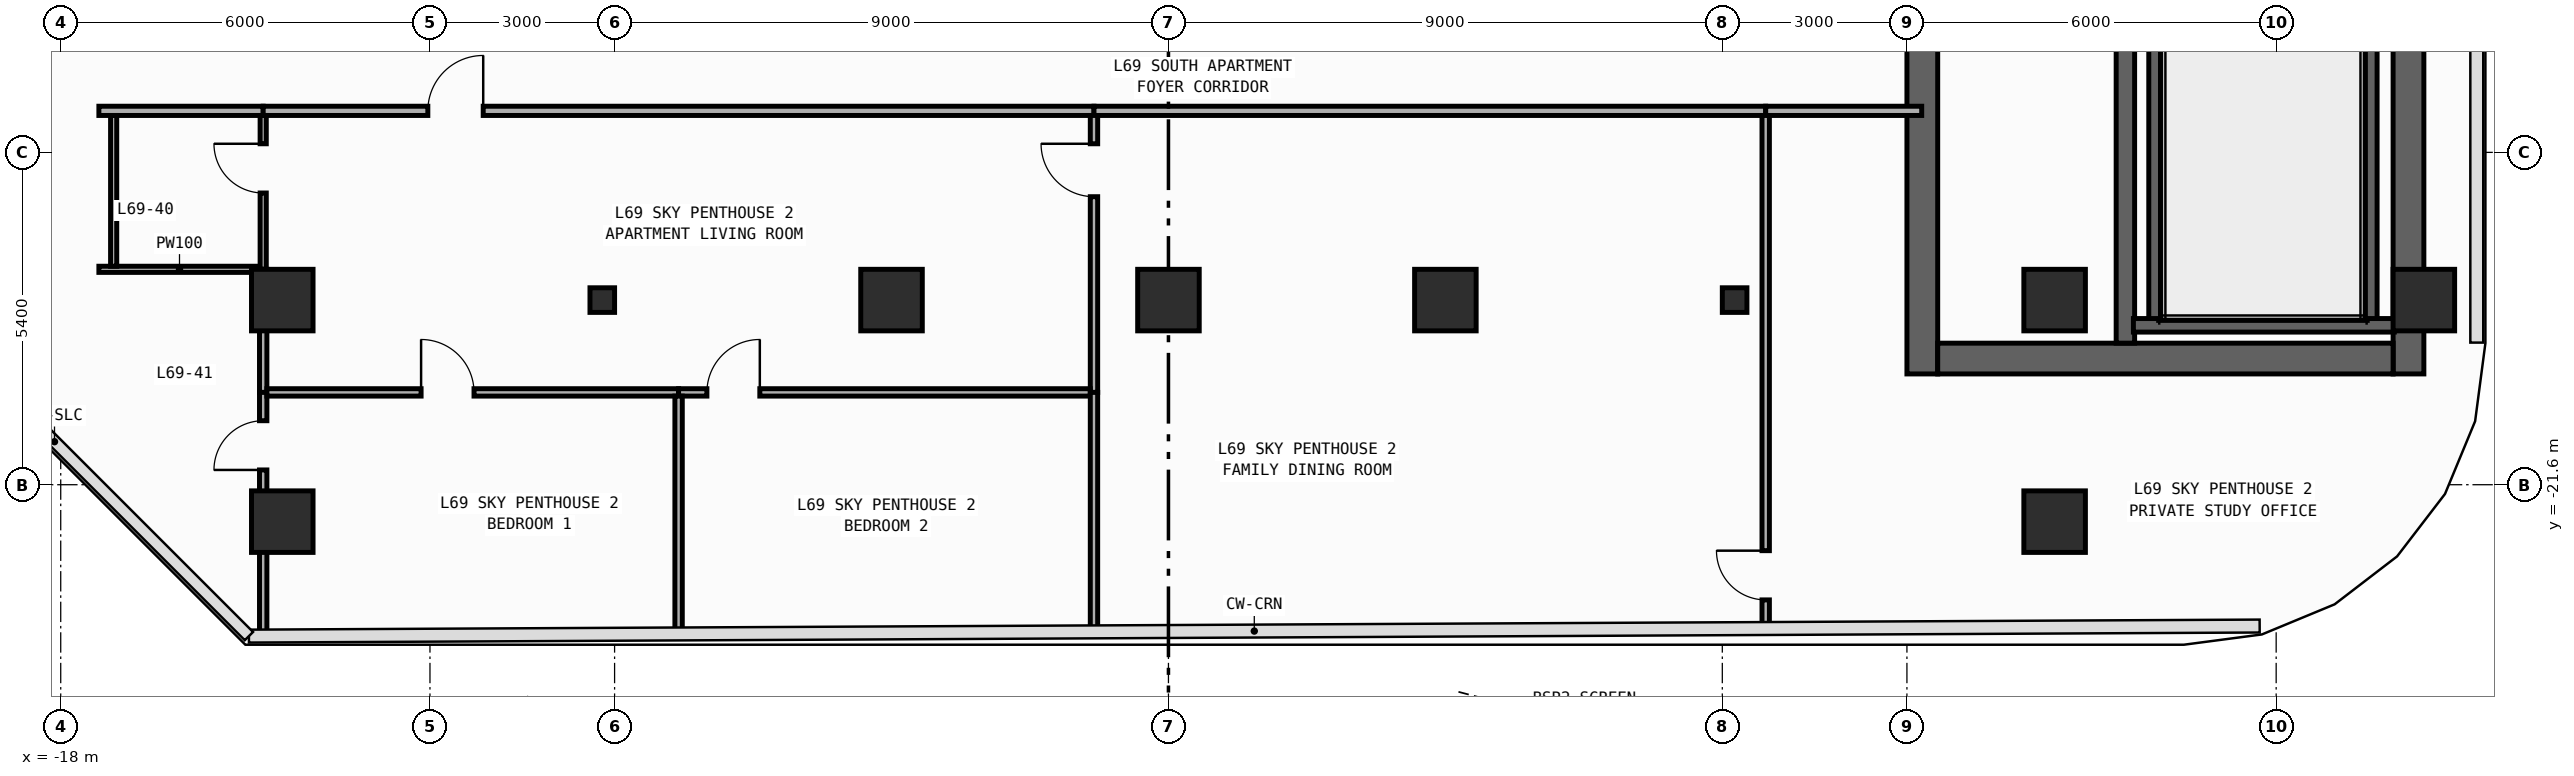
"""IFC4 building model, lengths in metres.
Left out: names, types, materials, properties, quantities, classifications, styles, units other than length and angle.
Written with IfcOpenShell. Run it as: python <this file> out.ifc"""

import sys

from ifc_helpers import new_model, si_unit, direction, frame, frame_2d, origin, origin_2d, place, context, subcontext, project, spatial, rectangle, circle, i_section, extrude, element, fill, save


model = new_model("IFC4")
c1 = context("Model", 3, precision=1e-05, world=origin(), true_north=direction((0.0, 1.0)))
c2 = subcontext(c1, "Body", "Model", "MODEL_VIEW")
j1 = project(units=[si_unit("LENGTHUNIT", "METRE"), si_unit("PLANEANGLEUNIT", "RADIAN")], contexts=[c1])
p1 = place(None, origin())
s1 = spatial("IfcSite", under=j1, at=p1, CompositionType="ELEMENT")
p2 = place(p1, origin())
s2 = spatial("IfcBuilding", under=s1, at=p2, CompositionType="ELEMENT")
p3 = place(p2, frame((0.0, 0.0, 289.0)))
s3 = spatial("IfcBuildingStorey", under=s2, at=p3, CompositionType="ELEMENT", Elevation=289.0)
p4 = place(p3, frame((12.25, -19.8, 0.0), z_axis=(0.0, 0.0, 1.0), x_axis=(0.0, 1.0, 0.0)))
e1 = element("IfcWall", 1, at=p4, inside=s3, PredefinedType="SHEAR", context=c2, shape_type="SweptSolid", body=[
    extrude(rectangle(XDim=27.0, YDim=0.5, at=frame_2d((13.5, 0.0))), origin(), (0.0, 0.0, 1.0), 3.54),
])
p5 = place(p4, frame((23.05, 0.0, 0.0)))
e2 = element("IfcOpeningElement", 2, at=p5, cuts=e1, PredefinedType="OPENING", context=c2, shape_type="SweptSolid", body=[
    extrude(rectangle(XDim=1.1, YDim=2.2, at=frame_2d((0.55, 1.1))), frame((0.0, 0.26, 0.0), z_axis=(0.0, -1.0, 0.0), x_axis=(1.0, 0.0, 0.0)), (0.0, 0.0, 1.0), 0.52),
])
p6 = place(p4, frame((19.85, 0.0, 0.0)))
e3 = element("IfcOpeningElement", 3, at=p6, cuts=e1, PredefinedType="OPENING", context=c2, shape_type="SweptSolid", body=[
    extrude(rectangle(XDim=1.1, YDim=2.2, at=frame_2d((0.55, 1.1))), frame((0.0, 0.26, 0.0), z_axis=(0.0, -1.0, 0.0), x_axis=(1.0, 0.0, 0.0)), (0.0, 0.0, 1.0), 0.52),
])
p7 = place(p4, frame((16.65, 0.0, 0.0)))
e4 = element("IfcOpeningElement", 4, at=p7, cuts=e1, PredefinedType="OPENING", context=c2, shape_type="SweptSolid", body=[
    extrude(rectangle(XDim=1.1, YDim=2.2, at=frame_2d((0.55, 1.1))), frame((0.0, 0.26, 0.0), z_axis=(0.0, -1.0, 0.0), x_axis=(1.0, 0.0, 0.0)), (0.0, 0.0, 1.0), 0.52),
])
p8 = place(p4, frame((10.175, 0.0, 0.0)))
e5 = element("IfcOpeningElement", 5, at=p8, cuts=e1, PredefinedType="OPENING", context=c2, shape_type="SweptSolid", body=[
    extrude(rectangle(XDim=0.85, YDim=2.1, at=frame_2d((0.425, 1.05))), frame((0.0, 0.26, 0.0), z_axis=(0.0, -1.0, 0.0), x_axis=(1.0, 0.0, 0.0)), (0.0, 0.0, 1.0), 0.52),
])
p9 = place(p4, frame((12.725, 0.0, 0.0)))
e6 = element("IfcOpeningElement", 6, at=p9, cuts=e1, PredefinedType="OPENING", context=c2, shape_type="SweptSolid", body=[
    extrude(rectangle(XDim=1.15, YDim=2.2, at=frame_2d((0.575, 1.1))), frame((0.0, 0.26, 0.0), z_axis=(0.0, -1.0, 0.0), x_axis=(1.0, 0.0, 0.0)), (0.0, 0.0, 1.0), 0.52),
])
p10 = place(p4, frame((25.125, 0.0, 0.0)))
e7 = element("IfcOpeningElement", 7, at=p10, cuts=e1, PredefinedType="OPENING", context=c2, shape_type="SweptSolid", body=[
    extrude(rectangle(XDim=0.85, YDim=2.1, at=frame_2d((0.425, 1.05))), frame((0.0, 0.26, 0.0), z_axis=(0.0, -1.0, 0.0), x_axis=(1.0, 0.0, 0.0)), (0.0, 0.0, 1.0), 0.52),
])
p11 = place(p3, frame((20.15, -19.8, 0.0), z_axis=(0.0, 0.0, 1.0), x_axis=(0.0, 1.0, 0.0)))
e8 = element("IfcWall", 8, at=p11, inside=s3, PredefinedType="SHEAR", context=c2, shape_type="SweptSolid", body=[
    extrude(rectangle(XDim=27.0, YDim=0.5, at=frame_2d((13.5, 0.0))), origin(), (0.0, 0.0, 1.0), 3.54),
])
p12 = place(p3, frame((12.5, -19.55, 0.0), z_axis=(0.0, 0.0, 1.0), x_axis=(1.0, 0.0, 0.0)))
e9 = element("IfcWall", 9, at=p12, inside=s3, PredefinedType="SHEAR", context=c2, shape_type="SweptSolid", body=[
    extrude(rectangle(XDim=7.4, YDim=0.5, at=frame_2d((3.7, 0.0))), origin(), (0.0, 0.0, 1.0), 3.54),
])
p13 = place(p3, frame((15.55, -19.3, 0.0), z_axis=(0.0, 0.0, 1.0), x_axis=(0.0, 1.0, 0.0)))
e10 = element("IfcWall", 10, at=p13, inside=s3, PredefinedType="SHEAR", context=c2, shape_type="SweptSolid", body=[
    extrude(rectangle(XDim=26.0, YDim=0.3, at=frame_2d((13.0, 0.0))), origin(), (0.0, 0.0, 1.0), 3.54),
])
p14 = place(p13, frame((12.225, 0.0, 0.0)))
e11 = element("IfcOpeningElement", 11, at=p14, cuts=e10, PredefinedType="OPENING", context=c2, shape_type="SweptSolid", body=[
    extrude(rectangle(XDim=1.15, YDim=2.2, at=frame_2d((0.575, 1.1))), frame((0.0, 0.16, 0.0), z_axis=(0.0, -1.0, 0.0), x_axis=(1.0, 0.0, 0.0)), (0.0, 0.0, 1.0), 0.32),
])
p15 = place(p13, frame((24.625, 0.0, 0.0)))
e12 = element("IfcOpeningElement", 12, at=p15, cuts=e10, PredefinedType="OPENING", context=c2, shape_type="SweptSolid", body=[
    extrude(rectangle(XDim=0.85, YDim=2.1, at=frame_2d((0.425, 1.05))), frame((0.0, 0.16, 0.0), z_axis=(0.0, -1.0, 0.0), x_axis=(1.0, 0.0, 0.0)), (0.0, 0.0, 1.0), 0.32),
])
for number, where, z_axis, x_axis in (
    (13, (16.04, -19.01, 0.0), (0.0, 0.0, 1.0), (0.0, 1.0, 0.0)),
    (14, (19.53, -19.01, 0.0), (0.0, 0.0, 1.0), (0.0, 1.0, 0.0)),
):
    element("IfcWall", number, at=place(p3, frame(where, z_axis=z_axis, x_axis=x_axis)), inside=s3, PredefinedType="SHEAR", context=c2, shape_type="SweptSolid", body=[
        extrude(rectangle(XDim=11.42, YDim=0.22, at=frame_2d((5.71, 0.0))), origin(), (0.0, 0.0, 1.0), 3.54),
    ])
p16 = place(p3, frame((15.68, -19.01, 0.0), z_axis=(0.0, 0.0, 1.0), x_axis=(1.0, 0.0, 0.0)))
e15 = element("IfcWall", 15, at=p16, inside=s3, PredefinedType="SHEAR", context=c2, shape_type="SweptSolid", body=[
    extrude(rectangle(XDim=4.24, YDim=0.22, at=frame_2d((2.12, 0.0))), origin(), (0.0, 0.0, 1.0), 3.54),
])
for number, where, z_axis, x_axis in (
    (16, (-9.2, -18.6, 0.0), (0.0, 0.0, 1.0), (1.0, 0.0, 0.0)),
    (17, (9.2, -18.6, 0.0), (0.0, 0.0, 1.0), (1.0, 0.0, 0.0)),
):
    element("IfcColumn", number, at=place(p3, frame(where, z_axis=z_axis, x_axis=x_axis)), inside=s3, PredefinedType="COLUMN", context=c2, shape_type="SweptSolid", body=[
        extrude(i_section(OverallWidth=0.4, OverallDepth=0.4, WebThickness=0.013, FlangeThickness=0.021, FilletRadius=0.022, at=origin_2d()), origin(), (0.0, 0.0, 1.0), 3.8),
    ])
for number, where, z_axis, x_axis in (
    (18, (20.4, -18.6, 0.0), (0.0, 0.0, 1.0), (1.0, 0.0, 0.0)),
    (19, (-14.4, -18.6, 0.0), (0.0, 0.0, 1.0), (1.0, 0.0, 0.0)),
    (20, (14.4, -18.6, 0.0), (0.0, 0.0, 1.0), (1.0, 0.0, 0.0)),
    (21, (-4.5, -18.6, 0.0), (0.0, 0.0, 1.0), (1.0, 0.0, 0.0)),
    (22, (0.0, -18.6, 0.0), (0.0, 0.0, 1.0), (1.0, 0.0, 0.0)),
    (23, (4.5, -18.6, 0.0), (0.0, 0.0, 1.0), (1.0, 0.0, 0.0)),
    (24, (-14.4, -22.2, 0.0), (0.0, 0.0, 1.0), (1.0, 0.0, 0.0)),
    (25, (14.4, -22.2, 0.0), (0.0, 0.0, 1.0), (1.0, 0.0, 0.0)),
):
    element("IfcColumn", number, at=place(p3, frame(where, z_axis=z_axis, x_axis=x_axis)), inside=s3, PredefinedType="COLUMN", context=c2, shape_type="SweptSolid", body=[
        extrude(circle(Radius=0.5, at=origin_2d()), origin(), (0.0, 0.0, 1.0), 3.8),
    ])
p17 = place(p3, frame((-17.38, -15.525, 0.0), z_axis=(0.0, 0.0, 1.0), x_axis=(1.0, 0.0, 0.0)))
e26 = element("IfcWall", 26, at=p17, inside=s3, PredefinedType="PARTITIONING", context=c2, shape_type="SweptSolid", body=[
    extrude(rectangle(XDim=2.67, YDim=0.15, at=frame_2d((1.335, 0.0))), origin(), (0.0, 0.0, 1.0), 3.54),
])
p18 = place(p3, frame((-14.71, -15.525, 0.0), z_axis=(0.0, 0.0, 1.0), x_axis=(1.0, 0.0, 0.0)))
e27 = element("IfcWall", 27, at=p18, inside=s3, PredefinedType="PARTITIONING", context=c2, shape_type="SweptSolid", body=[
    extrude(rectangle(XDim=13.5, YDim=0.15, at=frame_2d((6.75, 0.0))), origin(), (0.0, 0.0, 1.0), 3.54),
])
p19 = place(p18, frame((2.675, 0.0, 0.0)))
e28 = element("IfcOpeningElement", 28, at=p19, cuts=e27, PredefinedType="OPENING", context=c2, shape_type="SweptSolid", body=[
    extrude(rectangle(XDim=0.9, YDim=2.15, at=frame_2d((0.45, 1.075))), frame((0.0, 0.085, 0.0), z_axis=(0.0, -1.0, 0.0), x_axis=(1.0, 0.0, 0.0)), (0.0, 0.0, 1.0), 0.17),
])
p20 = place(p3, frame((-1.21, -15.525, 0.0), z_axis=(0.0, 0.0, 1.0), x_axis=(1.0, 0.0, 0.0)))
e29 = element("IfcWall", 29, at=p20, inside=s3, PredefinedType="PARTITIONING", context=c2, shape_type="SweptSolid", body=[
    extrude(rectangle(XDim=10.915, YDim=0.15, at=frame_2d((5.458, 0.0))), origin(), (0.0, 0.0, 1.0), 3.54),
])
p21 = place(p3, frame((9.705, -15.525, 0.0), z_axis=(0.0, 0.0, 1.0), x_axis=(1.0, 0.0, 0.0)))
e30 = element("IfcWall", 30, at=p21, inside=s3, PredefinedType="PARTITIONING", context=c2, shape_type="SweptSolid", body=[
    extrude(rectangle(XDim=2.535, YDim=0.15, at=frame_2d((1.268, 0.0))), origin(), (0.0, 0.0, 1.0), 3.54),
])
p22 = place(p3, frame((-17.38, -18.1, 0.0), z_axis=(0.0, 0.0, 1.0), x_axis=(1.0, 0.0, 0.0)))
e31 = element("IfcWall", 31, at=p22, inside=s3, PredefinedType="PARTITIONING", context=c2, shape_type="SweptSolid", body=[
    extrude(rectangle(XDim=2.62, YDim=0.1, at=frame_2d((1.31, 0.0))), origin(), (0.0, 0.0, 1.0), 3.54),
])
p23 = place(p3, frame((-14.71, -18.1, 0.0), z_axis=(0.0, 0.0, 1.0), x_axis=(0.0, 1.0, 0.0)))
e32 = element("IfcWall", 32, at=p23, inside=s3, PredefinedType="PARTITIONING", context=c2, shape_type="SweptSolid", body=[
    extrude(rectangle(XDim=2.5, YDim=0.1, at=frame_2d((1.25, 0.0))), origin(), (0.0, 0.0, 1.0), 2.64),
])
p24 = place(p23, frame((1.24, 0.0, 0.0)))
e33 = element("IfcOpeningElement", 33, at=p24, cuts=e32, PredefinedType="OPENING", context=c2, shape_type="SweptSolid", body=[
    extrude(rectangle(XDim=0.8, YDim=2.1, at=frame_2d((0.4, 1.05))), frame((0.0, 0.06, 0.0), z_axis=(0.0, -1.0, 0.0), x_axis=(1.0, 0.0, 0.0)), (0.0, 0.0, 1.0), 0.12),
])
p25 = place(p3, frame((-14.71, -20.1, 0.0), z_axis=(0.0, 0.0, 1.0), x_axis=(0.0, 1.0, 0.0)))
e34 = element("IfcWall", 34, at=p25, inside=s3, PredefinedType="PARTITIONING", context=c2, shape_type="SweptSolid", body=[
    extrude(rectangle(XDim=2.0, YDim=0.12, at=frame_2d((1.0, 0.0))), origin(), (0.0, 0.0, 1.0), 2.64),
])
p26 = place(p3, frame((-14.71, -24.054, 0.0), z_axis=(0.0, 0.0, 1.0), x_axis=(0.0, 1.0, 0.0)))
e35 = element("IfcWall", 35, at=p26, inside=s3, PredefinedType="PARTITIONING", context=c2, shape_type="SweptSolid", body=[
    extrude(rectangle(XDim=3.954, YDim=0.12, at=frame_2d((1.977, 0.0))), origin(), (0.0, 0.0, 1.0), 2.64),
])
p27 = place(p26, frame((2.694, 0.0, 0.0)))
e36 = element("IfcOpeningElement", 36, at=p27, cuts=e35, PredefinedType="OPENING", context=c2, shape_type="SweptSolid", body=[
    extrude(rectangle(XDim=0.8, YDim=2.1, at=frame_2d((0.4, 1.05))), frame((0.0, 0.07, 0.0), z_axis=(0.0, -1.0, 0.0), x_axis=(1.0, 0.0, 0.0)), (0.0, 0.0, 1.0), 0.14),
])
p28 = place(p3, frame((-1.21, -20.1, 0.0), z_axis=(0.0, 0.0, 1.0), x_axis=(0.0, 1.0, 0.0)))
e37 = element("IfcWall", 37, at=p28, inside=s3, PredefinedType="PARTITIONING", context=c2, shape_type="SweptSolid", body=[
    extrude(rectangle(XDim=4.5, YDim=0.12, at=frame_2d((2.25, 0.0))), origin(), (0.0, 0.0, 1.0), 3.54),
])
p29 = place(p28, frame((3.18, 0.0, 0.0)))
e38 = element("IfcOpeningElement", 38, at=p29, cuts=e37, PredefinedType="OPENING", context=c2, shape_type="SweptSolid", body=[
    extrude(rectangle(XDim=0.86, YDim=2.15, at=frame_2d((0.43, 1.075))), frame((0.0, 0.07, 0.0), z_axis=(0.0, -1.0, 0.0), x_axis=(1.0, 0.0, 0.0)), (0.0, 0.0, 1.0), 0.14),
])
p30 = place(p3, frame((-14.65, -20.1, 0.0), z_axis=(0.0, 0.0, 1.0), x_axis=(1.0, 0.0, 0.0)))
e39 = element("IfcWall", 39, at=p30, inside=s3, PredefinedType="PARTITIONING", context=c2, shape_type="SweptSolid", body=[
    extrude(rectangle(XDim=6.69, YDim=0.12, at=frame_2d((3.345, 0.0))), origin(), (0.0, 0.0, 1.0), 3.54),
])
p31 = place(p30, frame((2.506, 0.0, 0.0)))
e40 = element("IfcOpeningElement", 40, at=p31, cuts=e39, PredefinedType="OPENING", context=c2, shape_type="SweptSolid", body=[
    extrude(rectangle(XDim=0.86, YDim=2.15, at=frame_2d((0.43, 1.075))), frame((0.0, 0.07, 0.0), z_axis=(0.0, -1.0, 0.0), x_axis=(1.0, 0.0, 0.0)), (0.0, 0.0, 1.0), 0.14),
])
p32 = place(p3, frame((-7.96, -20.1, 0.0), z_axis=(0.0, 0.0, 1.0), x_axis=(1.0, 0.0, 0.0)))
e41 = element("IfcWall", 41, at=p32, inside=s3, PredefinedType="PARTITIONING", context=c2, shape_type="SweptSolid", body=[
    extrude(rectangle(XDim=6.69, YDim=0.12, at=frame_2d((3.345, 0.0))), origin(), (0.0, 0.0, 1.0), 3.54),
])
p33 = place(p32, frame((0.46, 0.0, 0.0)))
e42 = element("IfcOpeningElement", 42, at=p33, cuts=e41, PredefinedType="OPENING", context=c2, shape_type="SweptSolid", body=[
    extrude(rectangle(XDim=0.86, YDim=2.15, at=frame_2d((0.43, 1.075))), frame((0.0, 0.07, 0.0), z_axis=(0.0, -1.0, 0.0), x_axis=(1.0, 0.0, 0.0)), (0.0, 0.0, 1.0), 0.14),
])
p34 = place(p3, frame((9.705, -23.932, 0.0), z_axis=(0.0, 0.0, 1.0), x_axis=(0.0, 1.0, 0.0)))
e43 = element("IfcWall", 43, at=p34, inside=s3, PredefinedType="PARTITIONING", context=c2, shape_type="SweptSolid", body=[
    extrude(rectangle(XDim=8.332, YDim=0.12, at=frame_2d((4.166, 0.0))), origin(), (0.0, 0.0, 1.0), 3.54),
])
p35 = place(p34, frame((0.46, 0.0, 0.0)))
e44 = element("IfcOpeningElement", 44, at=p35, cuts=e43, PredefinedType="OPENING", context=c2, shape_type="SweptSolid", body=[
    extrude(rectangle(XDim=0.8, YDim=2.1, at=frame_2d((0.4, 1.05))), frame((0.0, 0.07, 0.0), z_axis=(0.0, -1.0, 0.0), x_axis=(1.0, 0.0, 0.0)), (0.0, 0.0, 1.0), 0.14),
])
p36 = place(p3, frame((-1.21, -23.986, 0.0), z_axis=(0.0, 0.0, 1.0), x_axis=(0.0, 1.0, 0.0)))
e45 = element("IfcWall", 45, at=p36, inside=s3, PredefinedType="PARTITIONING", context=c2, shape_type="SweptSolid", body=[
    extrude(rectangle(XDim=3.886, YDim=0.12, at=frame_2d((1.943, 0.0))), origin(), (0.0, 0.0, 1.0), 3.54),
])
p37 = place(p3, frame((-7.96, -24.02, 0.0), z_axis=(0.0, 0.0, 1.0), x_axis=(0.0, 1.0, 0.0)))
e46 = element("IfcWall", 46, at=p37, inside=s3, PredefinedType="PARTITIONING", context=c2, shape_type="SweptSolid", body=[
    extrude(rectangle(XDim=3.86, YDim=0.12, at=frame_2d((1.93, 0.0))), origin(), (0.0, 0.0, 1.0), 3.54),
])
p38 = place(p3, frame((-17.14, -18.05, 0.0), z_axis=(0.0, 0.0, 1.0), x_axis=(0.0, 1.0, 0.0)))
e47 = element("IfcWall", 47, at=p38, inside=s3, PredefinedType="PARTITIONING", context=c2, shape_type="SweptSolid", body=[
    extrude(rectangle(XDim=2.45, YDim=0.1, at=frame_2d((1.225, 0.0))), origin(), (0.0, 0.0, 1.0), 3.54),
])
p39 = place(p19, origin())
e48 = element("IfcDoor", 48, at=p39, inside=s3, OperationType="SINGLE_SWING_RIGHT", PredefinedType="DOOR", context=c2, shape_type="SweptSolid", body=[
    extrude(rectangle(XDim=0.9, YDim=2.15, at=frame_2d((0.45, 1.075))), frame((0.0, 0.025, 0.0), z_axis=(0.0, -1.0, 0.0), x_axis=(1.0, 0.0, 0.0)), (0.0, 0.0, 1.0), 0.05),
])
fill(e28, e48)
p40 = place(p24, origin())
e49 = element("IfcDoor", 49, at=p40, inside=s3, OperationType="SINGLE_SWING_RIGHT", PredefinedType="DOOR", context=c2, shape_type="SweptSolid", body=[
    extrude(rectangle(XDim=0.8, YDim=2.1, at=frame_2d((0.4, 1.05))), frame((0.0, 0.025, 0.0), z_axis=(0.0, -1.0, 0.0), x_axis=(1.0, 0.0, 0.0)), (0.0, 0.0, 1.0), 0.05),
])
fill(e33, e49)
p41 = place(p29, origin())
e50 = element("IfcDoor", 50, at=p41, inside=s3, OperationType="SINGLE_SWING_RIGHT", PredefinedType="DOOR", context=c2, shape_type="SweptSolid", body=[
    extrude(rectangle(XDim=0.86, YDim=2.15, at=frame_2d((0.43, 1.075))), frame((0.0, 0.025, 0.0), z_axis=(0.0, -1.0, 0.0), x_axis=(1.0, 0.0, 0.0)), (0.0, 0.0, 1.0), 0.05),
])
fill(e38, e50)
p42 = place(p31, origin())
e51 = element("IfcDoor", 51, at=p42, inside=s3, OperationType="SINGLE_SWING_LEFT", PredefinedType="DOOR", context=c2, shape_type="SweptSolid", body=[
    extrude(rectangle(XDim=0.86, YDim=2.15, at=frame_2d((0.43, 1.075))), frame((0.0, 0.025, 0.0), z_axis=(0.0, -1.0, 0.0), x_axis=(1.0, 0.0, 0.0)), (0.0, 0.0, 1.0), 0.05),
])
fill(e40, e51)
p43 = place(p33, origin())
e52 = element("IfcDoor", 52, at=p43, inside=s3, OperationType="SINGLE_SWING_RIGHT", PredefinedType="DOOR", context=c2, shape_type="SweptSolid", body=[
    extrude(rectangle(XDim=0.86, YDim=2.15, at=frame_2d((0.43, 1.075))), frame((0.0, 0.025, 0.0), z_axis=(0.0, -1.0, 0.0), x_axis=(1.0, 0.0, 0.0)), (0.0, 0.0, 1.0), 0.05),
])
fill(e42, e52)
p44 = place(p35, origin())
e53 = element("IfcDoor", 53, at=p44, inside=s3, OperationType="SINGLE_SWING_RIGHT", PredefinedType="DOOR", context=c2, shape_type="SweptSolid", body=[
    extrude(rectangle(XDim=0.8, YDim=2.1, at=frame_2d((0.4, 1.05))), frame((0.0, 0.025, 0.0), z_axis=(0.0, -1.0, 0.0), x_axis=(1.0, 0.0, 0.0)), (0.0, 0.0, 1.0), 0.05),
])
fill(e44, e53)
p45 = place(p27, origin())
e54 = element("IfcDoor", 54, at=p45, inside=s3, OperationType="SINGLE_SWING_LEFT", PredefinedType="DOOR", context=c2, shape_type="SweptSolid", body=[
    extrude(rectangle(XDim=0.8, YDim=2.1, at=frame_2d((0.4, 1.05))), frame((0.0, 0.025, 0.0), z_axis=(0.0, -1.0, 0.0), x_axis=(1.0, 0.0, 0.0)), (0.0, 0.0, 1.0), 0.05),
])
fill(e36, e54)
save(model, sys.argv[1])
